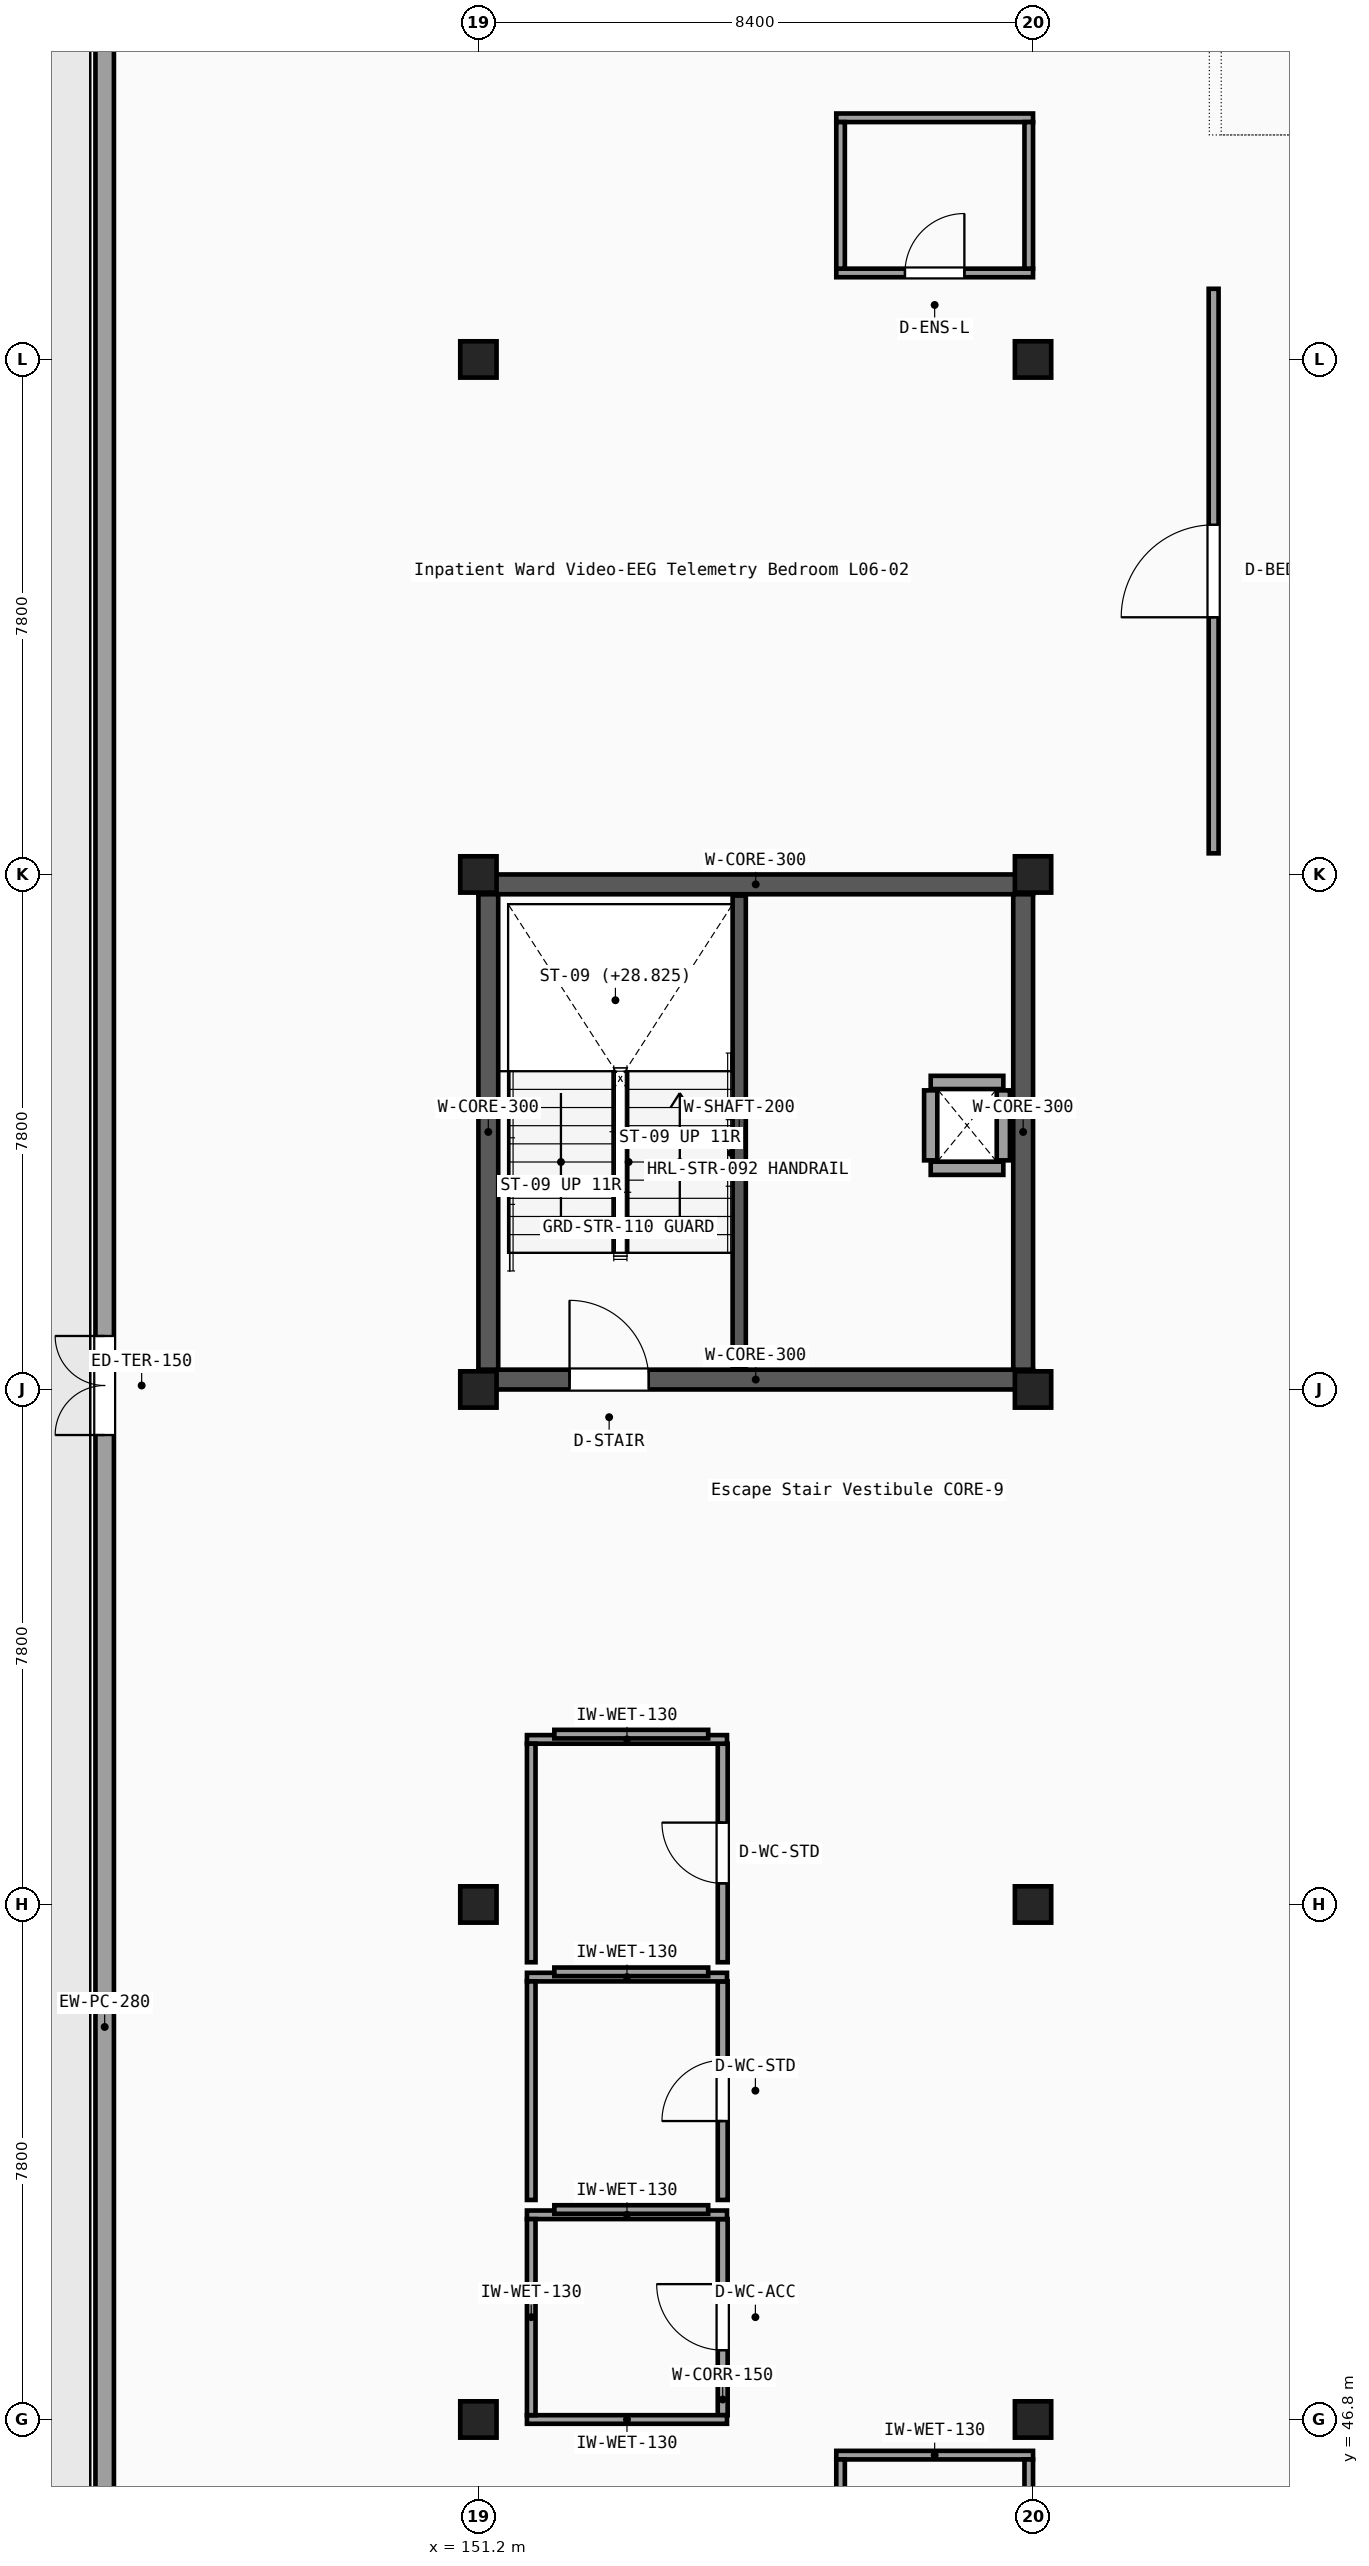
"""IFC4 building model, lengths in metres.
Left out: names, types, materials, properties, quantities, classifications, styles, units other than length and angle.
Written with IfcOpenShell. Run it as: python <this file> out.ifc"""

import sys

from ifc_helpers import new_model, si_unit, direction, frame, frame_2d, origin, origin_2d, place, context, subcontext, project, spatial, rectangle, extrude, element, fill, save


model = new_model("IFC4")
c1 = context("Model", 3, precision=1e-05, world=origin(), true_north=direction((0.0, 1.0)))
c2 = subcontext(c1, "Body", "Model", "MODEL_VIEW")
j1 = project(units=[si_unit("LENGTHUNIT", "METRE"), si_unit("PLANEANGLEUNIT", "RADIAN")], contexts=[c1])
p1 = place(None, origin())
s1 = spatial("IfcSite", under=j1, at=p1, CompositionType="ELEMENT")
p2 = place(p1, origin())
s2 = spatial("IfcBuilding", under=s1, at=p2, CompositionType="ELEMENT")
p3 = place(p2, frame((0.0, 0.0, 27.0)))
s3 = spatial("IfcBuildingStorey", under=s2, at=p3, CompositionType="ELEMENT", Elevation=27.0)
for number, where, z_axis, x_axis in (
    (1, (151.2, 46.8, 0.0), (0.0, 0.0, 1.0), (1.0, 0.0, 0.0)),
    (2, (151.2, 54.6, 0.0), (0.0, 0.0, 1.0), (1.0, 0.0, 0.0)),
    (3, (151.2, 62.4, 0.0), (0.0, 0.0, 1.0), (1.0, 0.0, 0.0)),
    (4, (151.2, 70.2, 0.0), (0.0, 0.0, 1.0), (1.0, 0.0, 0.0)),
    (5, (151.2, 78.0, 0.0), (0.0, 0.0, 1.0), (1.0, 0.0, 0.0)),
    (6, (159.6, 46.8, 0.0), (0.0, 0.0, 1.0), (1.0, 0.0, 0.0)),
    (7, (159.6, 54.6, 0.0), (0.0, 0.0, 1.0), (1.0, 0.0, 0.0)),
    (8, (159.6, 62.4, 0.0), (0.0, 0.0, 1.0), (1.0, 0.0, 0.0)),
    (9, (159.6, 70.2, 0.0), (0.0, 0.0, 1.0), (1.0, 0.0, 0.0)),
    (10, (159.6, 78.0, 0.0), (0.0, 0.0, 1.0), (1.0, 0.0, 0.0)),
):
    element("IfcColumn", number, at=place(p3, frame(where, z_axis=z_axis, x_axis=x_axis)), inside=s3, PredefinedType="COLUMN", context=c2, shape_type="SweptSolid", body=[
        extrude(rectangle(XDim=0.55, YDim=0.55, at=origin_2d()), origin(), (0.0, 0.0, 1.0), 4.05),
    ])
p4 = place(p3, frame((145.54, 39.56, 0.0), z_axis=(0.0, 0.0, 1.0), x_axis=(0.0, 1.0, 0.0)))
e11 = element("IfcWall", 11, at=p4, inside=s3, PredefinedType="SOLIDWALL", context=c2, shape_type="SweptSolid", body=[
    extrude(rectangle(XDim=75.2, YDim=0.28, at=frame_2d((37.6, 0.0))), origin(), (0.0, 0.0, 1.0), 3.77),
])
p5 = place(p4, frame((22.15, 0.0, 0.0)))
e12 = element("IfcOpeningElement", 12, at=p5, cuts=e11, PredefinedType="OPENING", context=c2, shape_type="SweptSolid", body=[
    extrude(rectangle(XDim=1.5, YDim=2.2, at=frame_2d((0.75, 1.1))), frame((0.0, 0.15, 0.0), z_axis=(0.0, -1.0, 0.0), x_axis=(1.0, 0.0, 0.0)), (0.0, 0.0, 1.0), 0.3),
])
p6 = place(p4, frame((61.6, 0.0, 0.0)))
e13 = element("IfcOpeningElement", 13, at=p6, cuts=e11, PredefinedType="OPENING", context=c2, shape_type="SweptSolid", body=[
    extrude(rectangle(XDim=1.2, YDim=2.2, at=frame_2d((0.6, 1.1))), frame((0.0, 0.15, 0.0), z_axis=(0.0, -1.0, 0.0), x_axis=(1.0, 0.0, 0.0)), (0.0, 0.0, 1.0), 0.3),
])
p7 = place(p3, frame((151.2, 62.55, 0.0), z_axis=(0.0, 0.0, 1.0), x_axis=(1.0, 0.0, 0.0)))
e14 = element("IfcWall", 14, at=p7, inside=s3, PredefinedType="SHEAR", context=c2, shape_type="SweptSolid", body=[
    extrude(rectangle(XDim=8.4, YDim=0.3, at=frame_2d((4.2, 0.0))), origin(), (0.0, 0.0, 1.0), 3.83),
])
p8 = place(p7, frame((1.38, 0.0, 0.0)))
e15 = element("IfcOpeningElement", 15, at=p8, cuts=e14, PredefinedType="OPENING", context=c2, shape_type="SweptSolid", body=[
    extrude(rectangle(XDim=1.2, YDim=2.15, at=frame_2d((0.6, 1.075))), frame((0.0, 0.16, 0.0), z_axis=(0.0, -1.0, 0.0), x_axis=(1.0, 0.0, 0.0)), (0.0, 0.0, 1.0), 0.32),
])
p9 = place(p3, frame((151.2, 70.05, 0.0), z_axis=(0.0, 0.0, 1.0), x_axis=(1.0, 0.0, 0.0)))
e16 = element("IfcWall", 16, at=p9, inside=s3, PredefinedType="SHEAR", context=c2, shape_type="SweptSolid", body=[
    extrude(rectangle(XDim=8.4, YDim=0.3, at=frame_2d((4.2, 0.0))), origin(), (0.0, 0.0, 1.0), 3.83),
])
for number, where, z_axis, x_axis in (
    (17, (151.35, 62.7, 0.0), (0.0, 0.0, 1.0), (0.0, 1.0, 0.0)),
    (18, (159.45, 62.7, 0.0), (0.0, 0.0, 1.0), (0.0, 1.0, 0.0)),
):
    element("IfcWall", number, at=place(p3, frame(where, z_axis=z_axis, x_axis=x_axis)), inside=s3, PredefinedType="SHEAR", context=c2, shape_type="SweptSolid", body=[
        extrude(rectangle(XDim=7.2, YDim=0.3, at=frame_2d((3.6, 0.0))), origin(), (0.0, 0.0, 1.0), 3.83),
    ])
p10 = place(p3, frame((155.15, 62.72, 0.0), z_axis=(0.0, 0.0, 1.0), x_axis=(0.0, 1.0, 0.0)))
e19 = element("IfcWall", 19, at=p10, inside=s3, PredefinedType="SHEAR", context=c2, shape_type="SweptSolid", body=[
    extrude(rectangle(XDim=7.16, YDim=0.2, at=frame_2d((3.58, 0.0))), origin(), (0.0, 0.0, 1.0), 3.83),
])
for number, where, z_axis, x_axis in (
    (20, (158.05, 65.75, 0.0), (0.0, 0.0, 1.0), (1.0, 0.0, 0.0)),
    (21, (158.05, 67.05, 0.0), (0.0, 0.0, 1.0), (1.0, 0.0, 0.0)),
):
    element("IfcWall", number, at=place(p3, frame(where, z_axis=z_axis, x_axis=x_axis)), inside=s3, PredefinedType="PARTITIONING", context=c2, shape_type="SweptSolid", body=[
        extrude(rectangle(XDim=1.1, YDim=0.2, at=frame_2d((0.55, 0.0))), origin(), (0.0, 0.0, 1.0), 3.26),
    ])
for number, where, z_axis, x_axis in (
    (22, (158.05, 65.87, 0.0), (0.0, 0.0, 1.0), (0.0, 1.0, 0.0)),
    (23, (159.15, 65.87, 0.0), (0.0, 0.0, 1.0), (0.0, 1.0, 0.0)),
):
    element("IfcWall", number, at=place(p3, frame(where, z_axis=z_axis, x_axis=x_axis)), inside=s3, PredefinedType="PARTITIONING", context=c2, shape_type="SweptSolid", body=[
        extrude(rectangle(XDim=1.06, YDim=0.2, at=frame_2d((0.53, 0.0))), origin(), (0.0, 0.0, 1.0), 3.26),
    ])
p11 = place(p3, frame((154.9, 46.865, 0.0), z_axis=(0.0, 0.0, 1.0), x_axis=(0.0, 1.0, 0.0)))
e24 = element("IfcWall", 24, at=p11, inside=s3, PredefinedType="PARTITIONING", context=c2, shape_type="SweptSolid", body=[
    extrude(rectangle(XDim=2.97, YDim=0.15, at=frame_2d((1.485, 0.0))), origin(), (0.0, 0.0, 1.0), 3.26),
])
p12 = place(p11, frame((0.985, 0.0, 0.0)))
e25 = element("IfcOpeningElement", 25, at=p12, cuts=e24, PredefinedType="OPENING", context=c2, shape_type="SweptSolid", body=[
    extrude(rectangle(XDim=1.0, YDim=2.15, at=frame_2d((0.5, 1.075))), frame((0.0, 0.085, 0.0), z_axis=(0.0, -1.0, 0.0), x_axis=(1.0, 0.0, 0.0)), (0.0, 0.0, 1.0), 0.17),
])
p13 = place(p3, frame((151.935, 46.8, 0.0), z_axis=(0.0, 0.0, 1.0), x_axis=(1.0, 0.0, 0.0)))
e26 = element("IfcWall", 26, at=p13, inside=s3, PredefinedType="PARTITIONING", context=c2, shape_type="SweptSolid", body=[
    extrude(rectangle(XDim=3.03, YDim=0.13, at=frame_2d((1.515, 0.0))), origin(), (0.0, 0.0, 1.0), 3.26),
])
p14 = place(p3, frame((151.935, 49.9, 0.0), z_axis=(0.0, 0.0, 1.0), x_axis=(1.0, 0.0, 0.0)))
e27 = element("IfcWall", 27, at=p14, inside=s3, PredefinedType="PARTITIONING", context=c2, shape_type="SweptSolid", body=[
    extrude(rectangle(XDim=3.03, YDim=0.13, at=frame_2d((1.515, 0.0))), origin(), (0.0, 0.0, 1.0), 3.77),
])
p15 = place(p3, frame((152.0, 46.865, 0.0), z_axis=(0.0, 0.0, 1.0), x_axis=(0.0, 1.0, 0.0)))
e28 = element("IfcWall", 28, at=p15, inside=s3, PredefinedType="PARTITIONING", context=c2, shape_type="SweptSolid", body=[
    extrude(rectangle(XDim=2.97, YDim=0.13, at=frame_2d((1.485, 0.0))), origin(), (0.0, 0.0, 1.0), 3.26),
])
p16 = place(p3, frame((152.35, 49.98, 0.0), z_axis=(0.0, 0.0, 1.0), x_axis=(1.0, 0.0, 0.0)))
e29 = element("IfcWall", 29, at=p16, inside=s3, PredefinedType="PARTITIONING", context=c2, shape_type="SweptSolid", body=[
    extrude(rectangle(XDim=2.33, YDim=0.13, at=frame_2d((1.165, 0.0))), origin(), (0.0, 0.0, 1.0), 3.77),
])
p17 = place(p3, frame((154.9, 50.125, 0.0), z_axis=(0.0, 0.0, 1.0), x_axis=(0.0, 1.0, 0.0)))
e30 = element("IfcWall", 30, at=p17, inside=s3, PredefinedType="PARTITIONING", context=c2, shape_type="SweptSolid", body=[
    extrude(rectangle(XDim=3.31, YDim=0.15, at=frame_2d((1.655, 0.0))), origin(), (0.0, 0.0, 1.0), 3.77),
])
p18 = place(p17, frame((1.195, 0.0, 0.0)))
e31 = element("IfcOpeningElement", 31, at=p18, cuts=e30, PredefinedType="OPENING", context=c2, shape_type="SweptSolid", body=[
    extrude(rectangle(XDim=0.92, YDim=2.15, at=frame_2d((0.46, 1.075))), frame((0.0, 0.085, 0.0), z_axis=(0.0, -1.0, 0.0), x_axis=(1.0, 0.0, 0.0)), (0.0, 0.0, 1.0), 0.17),
])
p19 = place(p3, frame((151.935, 53.5, 0.0), z_axis=(0.0, 0.0, 1.0), x_axis=(1.0, 0.0, 0.0)))
e32 = element("IfcWall", 32, at=p19, inside=s3, PredefinedType="PARTITIONING", context=c2, shape_type="SweptSolid", body=[
    extrude(rectangle(XDim=3.03, YDim=0.13, at=frame_2d((1.515, 0.0))), origin(), (0.0, 0.0, 1.0), 3.77),
])
p20 = place(p3, frame((152.0, 50.125, 0.0), z_axis=(0.0, 0.0, 1.0), x_axis=(0.0, 1.0, 0.0)))
e33 = element("IfcWall", 33, at=p20, inside=s3, PredefinedType="PARTITIONING", context=c2, shape_type="SweptSolid", body=[
    extrude(rectangle(XDim=3.31, YDim=0.13, at=frame_2d((1.655, 0.0))), origin(), (0.0, 0.0, 1.0), 3.77),
])
p21 = place(p3, frame((152.35, 53.58, 0.0), z_axis=(0.0, 0.0, 1.0), x_axis=(1.0, 0.0, 0.0)))
e34 = element("IfcWall", 34, at=p21, inside=s3, PredefinedType="PARTITIONING", context=c2, shape_type="SweptSolid", body=[
    extrude(rectangle(XDim=2.33, YDim=0.13, at=frame_2d((1.165, 0.0))), origin(), (0.0, 0.0, 1.0), 3.77),
])
p22 = place(p3, frame((154.9, 53.725, 0.0), z_axis=(0.0, 0.0, 1.0), x_axis=(0.0, 1.0, 0.0)))
e35 = element("IfcWall", 35, at=p22, inside=s3, PredefinedType="PARTITIONING", context=c2, shape_type="SweptSolid", body=[
    extrude(rectangle(XDim=3.31, YDim=0.15, at=frame_2d((1.655, 0.0))), origin(), (0.0, 0.0, 1.0), 3.26),
])
p23 = place(p22, frame((1.195, 0.0, 0.0)))
e36 = element("IfcOpeningElement", 36, at=p23, cuts=e35, PredefinedType="OPENING", context=c2, shape_type="SweptSolid", body=[
    extrude(rectangle(XDim=0.92, YDim=2.15, at=frame_2d((0.46, 1.075))), frame((0.0, 0.085, 0.0), z_axis=(0.0, -1.0, 0.0), x_axis=(1.0, 0.0, 0.0)), (0.0, 0.0, 1.0), 0.17),
])
p24 = place(p3, frame((151.935, 57.1, 0.0), z_axis=(0.0, 0.0, 1.0), x_axis=(1.0, 0.0, 0.0)))
e37 = element("IfcWall", 37, at=p24, inside=s3, PredefinedType="PARTITIONING", context=c2, shape_type="SweptSolid", body=[
    extrude(rectangle(XDim=3.03, YDim=0.13, at=frame_2d((1.515, 0.0))), origin(), (0.0, 0.0, 1.0), 3.77),
])
p25 = place(p3, frame((152.0, 53.725, 0.0), z_axis=(0.0, 0.0, 1.0), x_axis=(0.0, 1.0, 0.0)))
e38 = element("IfcWall", 38, at=p25, inside=s3, PredefinedType="PARTITIONING", context=c2, shape_type="SweptSolid", body=[
    extrude(rectangle(XDim=3.31, YDim=0.13, at=frame_2d((1.655, 0.0))), origin(), (0.0, 0.0, 1.0), 3.26),
])
p26 = place(p3, frame((152.35, 57.18, 0.0), z_axis=(0.0, 0.0, 1.0), x_axis=(1.0, 0.0, 0.0)))
e39 = element("IfcWall", 39, at=p26, inside=s3, PredefinedType="PARTITIONING", context=c2, shape_type="SweptSolid", body=[
    extrude(rectangle(XDim=2.33, YDim=0.13, at=frame_2d((1.165, 0.0))), origin(), (0.0, 0.0, 1.0), 3.77),
])
p27 = place(p3, frame((156.62, 46.26, 0.0), z_axis=(0.0, 0.0, 1.0), x_axis=(1.0, 0.0, 0.0)))
e40 = element("IfcWall", 40, at=p27, inside=s3, PredefinedType="PARTITIONING", context=c2, shape_type="SweptSolid", body=[
    extrude(rectangle(XDim=2.98, YDim=0.13, at=frame_2d((1.49, 0.0))), origin(), (0.0, 0.0, 1.0), 3.54),
])
p28 = place(p3, frame((156.685, 43.975, 0.0), z_axis=(0.0, 0.0, 1.0), x_axis=(0.0, 1.0, 0.0)))
e41 = element("IfcWall", 41, at=p28, inside=s3, PredefinedType="PARTITIONING", context=c2, shape_type="SweptSolid", body=[
    extrude(rectangle(XDim=2.22, YDim=0.13, at=frame_2d((1.11, 0.0))), origin(), (0.0, 0.0, 1.0), 3.77),
])
p29 = place(p3, frame((159.535, 43.975, 0.0), z_axis=(0.0, 0.0, 1.0), x_axis=(0.0, 1.0, 0.0)))
e42 = element("IfcWall", 42, at=p29, inside=s3, PredefinedType="PARTITIONING", context=c2, shape_type="SweptSolid", body=[
    extrude(rectangle(XDim=2.22, YDim=0.13, at=frame_2d((1.11, 0.0))), origin(), (0.0, 0.0, 1.0), 3.54),
])
p30 = place(p3, frame((162.335, 70.52, 0.0), z_axis=(0.0, 0.0, 1.0), x_axis=(0.0, 1.0, 0.0)))
e43 = element("IfcWall", 43, at=p30, inside=s3, PredefinedType="PARTITIONING", context=c2, shape_type="SweptSolid", body=[
    extrude(rectangle(XDim=8.55, YDim=0.15, at=frame_2d((4.275, 0.0))), origin(), (0.0, 0.0, 1.0), 3.26),
])
p31 = place(p30, frame((3.575, 0.0, 0.0)))
e44 = element("IfcOpeningElement", 44, at=p31, cuts=e43, PredefinedType="OPENING", context=c2, shape_type="SweptSolid", body=[
    extrude(rectangle(XDim=1.4, YDim=2.2, at=frame_2d((0.7, 1.1))), frame((0.0, 0.085, 0.0), z_axis=(0.0, -1.0, 0.0), x_axis=(1.0, 0.0, 0.0)), (0.0, 0.0, 1.0), 0.17),
])
p32 = place(p3, frame((156.62, 79.31, 0.0), z_axis=(0.0, 0.0, 1.0), x_axis=(1.0, 0.0, 0.0)))
e45 = element("IfcWall", 45, at=p32, inside=s3, PredefinedType="PARTITIONING", context=c2, shape_type="SweptSolid", body=[
    extrude(rectangle(XDim=2.98, YDim=0.13, at=frame_2d((1.49, 0.0))), origin(), (0.0, 0.0, 1.0), 3.54),
])
p33 = place(p32, frame((1.04, 0.0, 0.0)))
e46 = element("IfcOpeningElement", 46, at=p33, cuts=e45, PredefinedType="OPENING", context=c2, shape_type="SweptSolid", body=[
    extrude(rectangle(XDim=0.9, YDim=2.1, at=frame_2d((0.45, 1.05))), frame((0.0, 0.075, 0.0), z_axis=(0.0, -1.0, 0.0), x_axis=(1.0, 0.0, 0.0)), (0.0, 0.0, 1.0), 0.15),
])
p34 = place(p3, frame((156.62, 81.66, 0.0), z_axis=(0.0, 0.0, 1.0), x_axis=(1.0, 0.0, 0.0)))
e47 = element("IfcWall", 47, at=p34, inside=s3, PredefinedType="PARTITIONING", context=c2, shape_type="SweptSolid", body=[
    extrude(rectangle(XDim=2.98, YDim=0.13, at=frame_2d((1.49, 0.0))), origin(), (0.0, 0.0, 1.0), 3.54),
])
p35 = place(p3, frame((156.685, 79.375, 0.0), z_axis=(0.0, 0.0, 1.0), x_axis=(0.0, 1.0, 0.0)))
e48 = element("IfcWall", 48, at=p35, inside=s3, PredefinedType="PARTITIONING", context=c2, shape_type="SweptSolid", body=[
    extrude(rectangle(XDim=2.22, YDim=0.13, at=frame_2d((1.11, 0.0))), origin(), (0.0, 0.0, 1.0), 3.77),
])
p36 = place(p3, frame((159.535, 79.375, 0.0), z_axis=(0.0, 0.0, 1.0), x_axis=(0.0, 1.0, 0.0)))
e49 = element("IfcWall", 49, at=p36, inside=s3, PredefinedType="PARTITIONING", context=c2, shape_type="SweptSolid", body=[
    extrude(rectangle(XDim=2.22, YDim=0.13, at=frame_2d((1.11, 0.0))), origin(), (0.0, 0.0, 1.0), 3.54),
])
p37 = place(p5, origin())
e50 = element("IfcDoor", 50, at=p37, inside=s3, OperationType="DOUBLE_DOOR_SINGLE_SWING", PredefinedType="DOOR", context=c2, shape_type="SweptSolid", body=[
    extrude(rectangle(XDim=1.5, YDim=2.2, at=frame_2d((0.75, 1.1))), frame((0.0, 0.025, 0.0), z_axis=(0.0, -1.0, 0.0), x_axis=(1.0, 0.0, 0.0)), (0.0, 0.0, 1.0), 0.05),
])
fill(e12, e50)
p38 = place(p8, origin())
e51 = element("IfcDoor", 51, at=p38, inside=s3, OperationType="SINGLE_SWING_LEFT", PredefinedType="DOOR", context=c2, shape_type="SweptSolid", body=[
    extrude(rectangle(XDim=1.2, YDim=2.15, at=frame_2d((0.6, 1.075))), frame((0.0, 0.025, 0.0), z_axis=(0.0, -1.0, 0.0), x_axis=(1.0, 0.0, 0.0)), (0.0, 0.0, 1.0), 0.05),
])
fill(e15, e51)
p39 = place(p12, origin())
e52 = element("IfcDoor", 52, at=p39, inside=s3, OperationType="SINGLE_SWING_RIGHT", PredefinedType="DOOR", context=c2, shape_type="SweptSolid", body=[
    extrude(rectangle(XDim=1.0, YDim=2.15, at=frame_2d((0.5, 1.075))), frame((0.0, 0.025, 0.0), z_axis=(0.0, -1.0, 0.0), x_axis=(1.0, 0.0, 0.0)), (0.0, 0.0, 1.0), 0.05),
])
fill(e25, e52)
p40 = place(p18, origin())
e53 = element("IfcDoor", 53, at=p40, inside=s3, OperationType="SINGLE_SWING_LEFT", PredefinedType="DOOR", context=c2, shape_type="SweptSolid", body=[
    extrude(rectangle(XDim=0.92, YDim=2.15, at=frame_2d((0.46, 1.075))), frame((0.0, 0.025, 0.0), z_axis=(0.0, -1.0, 0.0), x_axis=(1.0, 0.0, 0.0)), (0.0, 0.0, 1.0), 0.05),
])
fill(e31, e53)
p41 = place(p23, origin())
e54 = element("IfcDoor", 54, at=p41, inside=s3, OperationType="SINGLE_SWING_RIGHT", PredefinedType="DOOR", context=c2, shape_type="SweptSolid", body=[
    extrude(rectangle(XDim=0.92, YDim=2.15, at=frame_2d((0.46, 1.075))), frame((0.0, 0.025, 0.0), z_axis=(0.0, -1.0, 0.0), x_axis=(1.0, 0.0, 0.0)), (0.0, 0.0, 1.0), 0.05),
])
fill(e36, e54)
p42 = place(p31, origin())
e55 = element("IfcDoor", 55, at=p42, inside=s3, OperationType="SINGLE_SWING_LEFT", PredefinedType="DOOR", context=c2, shape_type="SweptSolid", body=[
    extrude(rectangle(XDim=1.4, YDim=2.2, at=frame_2d((0.7, 1.1))), frame((0.0, 0.025, 0.0), z_axis=(0.0, -1.0, 0.0), x_axis=(1.0, 0.0, 0.0)), (0.0, 0.0, 1.0), 0.05),
])
fill(e44, e55)
p43 = place(p33, origin())
e56 = element("IfcDoor", 56, at=p43, inside=s3, OperationType="SINGLE_SWING_RIGHT", PredefinedType="DOOR", context=c2, shape_type="SweptSolid", body=[
    extrude(rectangle(XDim=0.9, YDim=2.1, at=frame_2d((0.45, 1.05))), frame((0.0, 0.025, 0.0), z_axis=(0.0, -1.0, 0.0), x_axis=(1.0, 0.0, 0.0)), (0.0, 0.0, 1.0), 0.05),
])
fill(e46, e56)
save(model, sys.argv[1])
